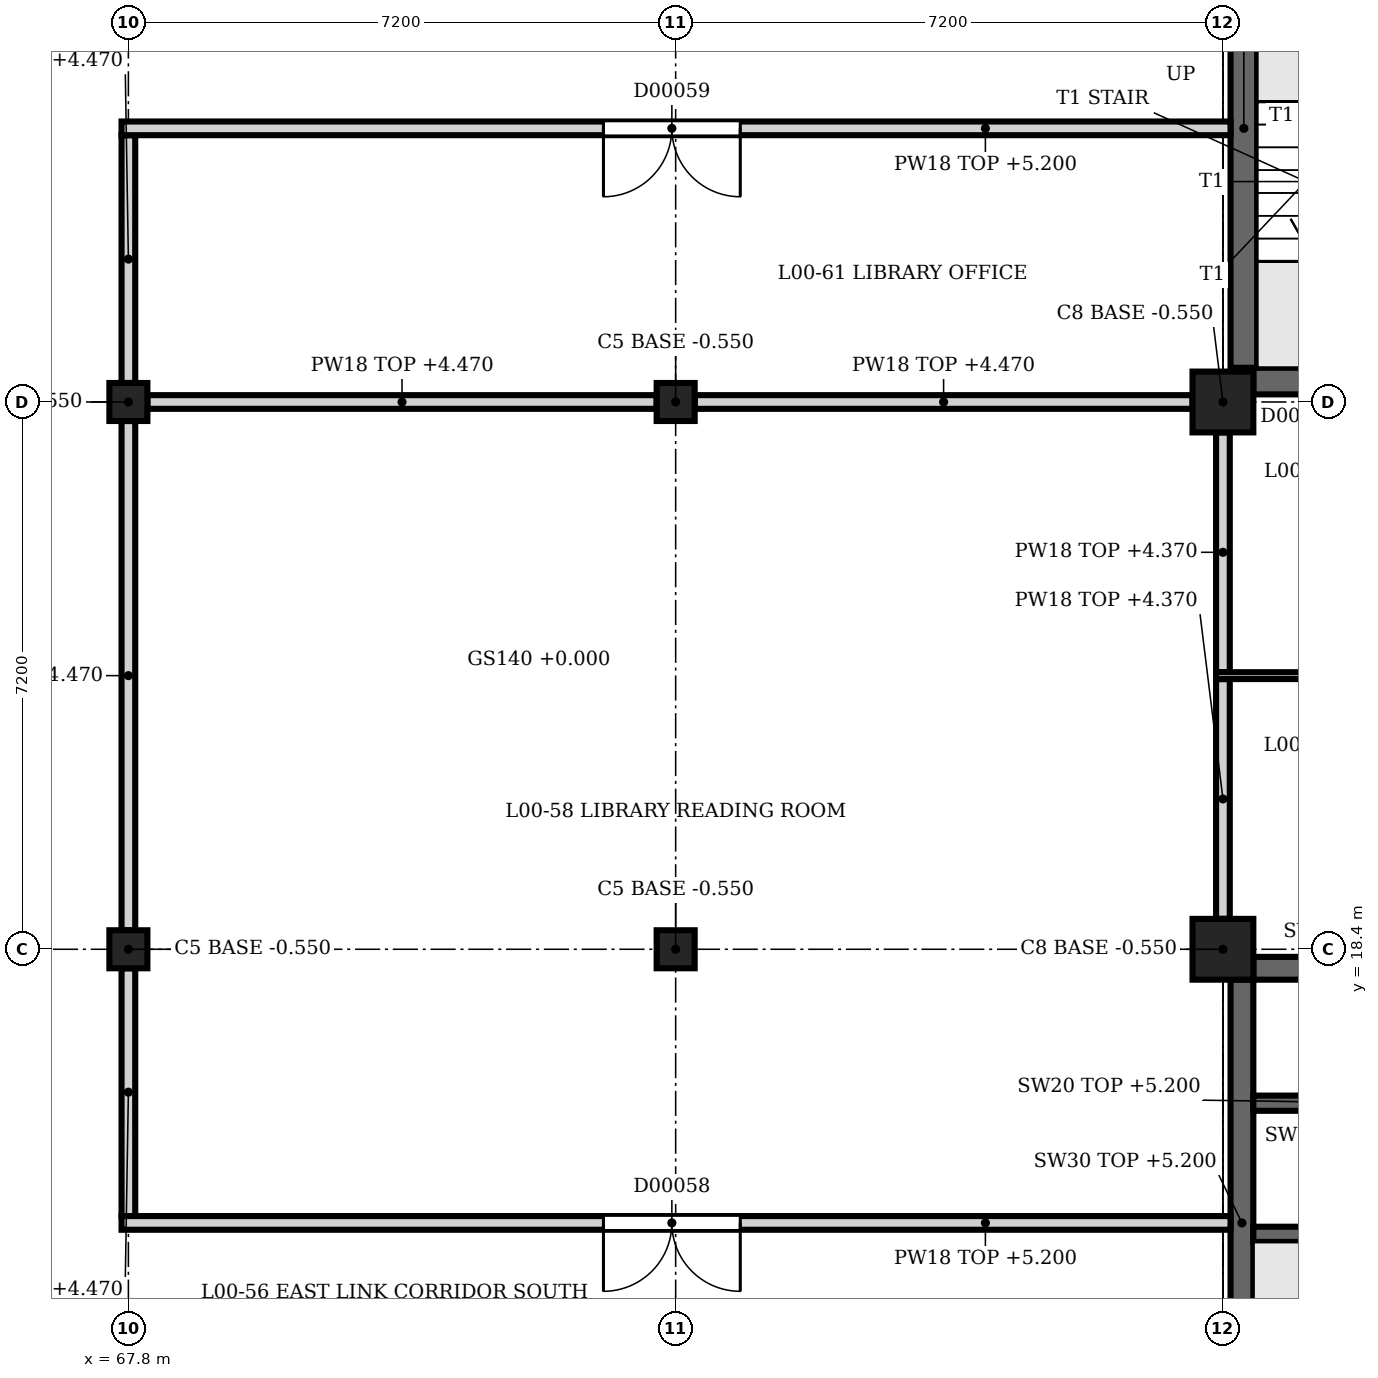
"""IFC4 building model, lengths in metres.
Left out: names, types, materials, properties, quantities, classifications, styles, units other than length and angle.
Written with IfcOpenShell. Run it as: python <this file> out.ifc"""

import sys

from ifc_helpers import new_model, si_unit, direction, frame, frame_2d, origin, origin_2d, place, context, subcontext, project, spatial, rectangle, extrude, element, fill, save


model = new_model("IFC4")
c1 = context("Model", 3, precision=1e-05, world=origin(), true_north=direction((0.0, 1.0)))
c2 = subcontext(c1, "Body", "Model", "MODEL_VIEW")
j1 = project(units=[si_unit("LENGTHUNIT", "METRE"), si_unit("PLANEANGLEUNIT", "RADIAN")], contexts=[c1])
p1 = place(None, origin())
s1 = spatial("IfcSite", under=j1, at=p1, CompositionType="ELEMENT")
p2 = place(p1, origin())
s2 = spatial("IfcBuilding", under=s1, at=p2, CompositionType="ELEMENT")
p3 = place(p2, origin())
s3 = spatial("IfcBuildingStorey", under=s2, at=p3, CompositionType="ELEMENT", Elevation=0.0)
for number, where, z_axis, x_axis in (
    (1, (82.2, 18.4, -0.55), (0.0, 0.0, 1.0), (1.0, 0.0, 0.0)),
    (2, (82.2, 25.6, -0.55), (0.0, 0.0, 1.0), (1.0, 0.0, 0.0)),
):
    element("IfcColumn", number, at=place(p3, frame(where, z_axis=z_axis, x_axis=x_axis)), inside=s3, PredefinedType="COLUMN", context=c2, shape_type="SweptSolid", body=[
        extrude(rectangle(XDim=0.8, YDim=0.8, at=origin_2d()), origin(), (0.0, 0.0, 1.0), 5.95),
    ])
for number, where, z_axis, x_axis in (
    (3, (67.8, 18.4, -0.55), (0.0, 0.0, 1.0), (1.0, 0.0, 0.0)),
    (4, (67.8, 25.6, -0.55), (0.0, 0.0, 1.0), (1.0, 0.0, 0.0)),
    (5, (75.0, 18.4, -0.55), (0.0, 0.0, 1.0), (1.0, 0.0, 0.0)),
    (6, (75.0, 25.6, -0.55), (0.0, 0.0, 1.0), (1.0, 0.0, 0.0)),
):
    element("IfcColumn", number, at=place(p3, frame(where, z_axis=z_axis, x_axis=x_axis)), inside=s3, PredefinedType="COLUMN", context=c2, shape_type="SweptSolid", body=[
        extrude(rectangle(XDim=0.5, YDim=0.5, at=origin_2d()), origin(), (0.0, 0.0, 1.0), 5.95),
    ])
p4 = place(p3, frame((82.6, 25.875, 0.0), z_axis=(0.0, 0.0, 1.0), x_axis=(1.0, 0.0, 0.0)))
e7 = element("IfcWall", 7, at=p4, inside=s3, PredefinedType="SHEAR", context=c2, shape_type="SweptSolid", body=[
    extrude(rectangle(XDim=6.4, YDim=0.35, at=frame_2d((3.2, 0.0))), origin(), (0.0, 0.0, 1.0), 5.2),
])
p5 = place(p4, frame((3.8, 0.0, 0.0)))
e8 = element("IfcOpeningElement", 8, at=p5, cuts=e7, PredefinedType="OPENING", context=c2, shape_type="SweptSolid", body=[
    extrude(rectangle(XDim=1.2, YDim=2.1, at=frame_2d((0.6, 1.05))), frame((0.0, 0.185, 0.0), z_axis=(0.0, -1.0, 0.0), x_axis=(1.0, 0.0, 0.0)), (0.0, 0.0, 1.0), 0.37),
])
p6 = place(p3, frame((82.475, 26.05, 0.0), z_axis=(0.0, 0.0, 1.0), x_axis=(0.0, 1.0, 0.0)))
e9 = element("IfcWall", 9, at=p6, inside=s3, PredefinedType="SHEAR", context=c2, shape_type="SweptSolid", body=[
    extrude(rectangle(XDim=6.3, YDim=0.35, at=frame_2d((3.15, 0.0))), origin(), (0.0, 0.0, 1.0), 5.2),
])
for number, where, z_axis, x_axis in (
    (10, (82.45, 11.6, 0.0), (0.0, 0.0, 1.0), (0.0, 1.0, 0.0)),
    (11, (82.6, 18.15, 0.0), (0.0, 0.0, 1.0), (1.0, 0.0, 0.0)),
):
    element("IfcWall", number, at=place(p3, frame(where, z_axis=z_axis, x_axis=x_axis)), inside=s3, PredefinedType="SHEAR", context=c2, shape_type="SweptSolid", body=[
        extrude(rectangle(XDim=6.4, YDim=0.3, at=frame_2d((3.2, 0.0))), origin(), (0.0, 0.0, 1.0), 5.2),
    ])
p7 = place(p3, frame((82.6, 14.65, 0.0), z_axis=(0.0, 0.0, 1.0), x_axis=(1.0, 0.0, 0.0)))
e12 = element("IfcWall", 12, at=p7, inside=s3, PredefinedType="SHEAR", context=c2, shape_type="SweptSolid", body=[
    extrude(rectangle(XDim=6.4, YDim=0.2, at=frame_2d((3.2, 0.0))), origin(), (0.0, 0.0, 1.0), 5.2),
])
p8 = place(p7, frame((5.3, 0.0, 0.0)))
e13 = element("IfcOpeningElement", 13, at=p8, cuts=e12, PredefinedType="OPENING", context=c2, shape_type="SweptSolid", body=[
    extrude(rectangle(XDim=1.0, YDim=2.1, at=frame_2d((0.5, 1.05))), frame((0.0, 0.11, 0.0), z_axis=(0.0, -1.0, 0.0), x_axis=(1.0, 0.0, 0.0)), (0.0, 0.0, 1.0), 0.22),
])
p9 = place(p3, frame((82.6, 16.375, 0.0), z_axis=(0.0, 0.0, 1.0), x_axis=(1.0, 0.0, 0.0)))
e14 = element("IfcWall", 14, at=p9, inside=s3, PredefinedType="SHEAR", context=c2, shape_type="SweptSolid", body=[
    extrude(rectangle(XDim=3.8, YDim=0.2, at=frame_2d((1.9, 0.0))), origin(), (0.0, 0.0, 1.0), 5.2),
])
p10 = place(p3, frame((82.3, 14.8, 0.0), z_axis=(0.0, 0.0, 1.0), x_axis=(-1.0, 0.0, 0.0)))
e15 = element("IfcWall", 15, at=p10, inside=s3, PredefinedType="PARTITIONING", context=c2, shape_type="SweptSolid", body=[
    extrude(rectangle(XDim=14.59, YDim=0.18, at=frame_2d((7.295, 0.0))), origin(), (0.0, 0.0, 1.0), 5.2),
])
p11 = place(p10, frame((6.45, 0.0, 0.0)))
e16 = element("IfcOpeningElement", 16, at=p11, cuts=e15, PredefinedType="OPENING", context=c2, shape_type="SweptSolid", body=[
    extrude(rectangle(XDim=1.8, YDim=2.1, at=frame_2d((0.9, 1.05))), frame((0.0, 0.1, 0.0), z_axis=(0.0, -1.0, 0.0), x_axis=(1.0, 0.0, 0.0)), (0.0, 0.0, 1.0), 0.2),
])
p12 = place(p3, frame((82.11, 22.0, 0.0), z_axis=(0.0, 0.0, 1.0), x_axis=(1.0, 0.0, 0.0)))
e17 = element("IfcWall", 17, at=p12, inside=s3, PredefinedType="PARTITIONING", context=c2, shape_type="SweptSolid", body=[
    extrude(rectangle(XDim=3.735, YDim=0.09, at=frame_2d((1.867, 0.0))), origin(), (0.0, 0.0, 1.0), 5.2),
])
p13 = place(p3, frame((68.05, 25.6, 0.0), z_axis=(0.0, 0.0, 1.0), x_axis=(1.0, 0.0, 0.0)))
e18 = element("IfcWall", 18, at=p13, inside=s3, PredefinedType="PARTITIONING", context=c2, shape_type="SweptSolid", body=[
    extrude(rectangle(XDim=6.7, YDim=0.18, at=frame_2d((3.35, 0.0))), origin(), (0.0, 0.0, 1.0), 4.47),
])
p14 = place(p3, frame((75.25, 25.6, 0.0), z_axis=(0.0, 0.0, 1.0), x_axis=(1.0, 0.0, 0.0)))
e19 = element("IfcWall", 19, at=p14, inside=s3, PredefinedType="PARTITIONING", context=c2, shape_type="SweptSolid", body=[
    extrude(rectangle(XDim=6.55, YDim=0.18, at=frame_2d((3.275, 0.0))), origin(), (0.0, 0.0, 1.0), 4.47),
])
p15 = place(p3, frame((82.3, 29.2, 0.0), z_axis=(0.0, 0.0, 1.0), x_axis=(-1.0, 0.0, 0.0)))
e20 = element("IfcWall", 20, at=p15, inside=s3, PredefinedType="PARTITIONING", context=c2, shape_type="SweptSolid", body=[
    extrude(rectangle(XDim=14.59, YDim=0.18, at=frame_2d((7.295, 0.0))), origin(), (0.0, 0.0, 1.0), 5.2),
])
p16 = place(p15, frame((6.45, 0.0, 0.0)))
e21 = element("IfcOpeningElement", 21, at=p16, cuts=e20, PredefinedType="OPENING", context=c2, shape_type="SweptSolid", body=[
    extrude(rectangle(XDim=1.8, YDim=2.1, at=frame_2d((0.9, 1.05))), frame((0.0, 0.1, 0.0), z_axis=(0.0, -1.0, 0.0), x_axis=(1.0, 0.0, 0.0)), (0.0, 0.0, 1.0), 0.2),
])
p17 = place(p3, frame((67.8, 14.89, 0.0), z_axis=(0.0, 0.0, 1.0), x_axis=(0.0, 1.0, 0.0)))
e22 = element("IfcWall", 22, at=p17, inside=s3, PredefinedType="PARTITIONING", context=c2, shape_type="SweptSolid", body=[
    extrude(rectangle(XDim=3.26, YDim=0.18, at=frame_2d((1.63, 0.0))), origin(), (0.0, 0.0, 1.0), 4.47),
])
p18 = place(p3, frame((67.8, 18.65, 0.0), z_axis=(0.0, 0.0, 1.0), x_axis=(0.0, 1.0, 0.0)))
e23 = element("IfcWall", 23, at=p18, inside=s3, PredefinedType="PARTITIONING", context=c2, shape_type="SweptSolid", body=[
    extrude(rectangle(XDim=6.7, YDim=0.18, at=frame_2d((3.35, 0.0))), origin(), (0.0, 0.0, 1.0), 4.47),
])
p19 = place(p3, frame((67.8, 25.85, 0.0), z_axis=(0.0, 0.0, 1.0), x_axis=(0.0, 1.0, 0.0)))
e24 = element("IfcWall", 24, at=p19, inside=s3, PredefinedType="PARTITIONING", context=c2, shape_type="SweptSolid", body=[
    extrude(rectangle(XDim=3.26, YDim=0.18, at=frame_2d((1.63, 0.0))), origin(), (0.0, 0.0, 1.0), 4.47),
])
for number, where, z_axis, x_axis in (
    (25, (82.2, 18.8, 0.0), (0.0, 0.0, 1.0), (0.0, 1.0, 0.0)),
    (26, (82.2, 22.045, 0.0), (0.0, 0.0, 1.0), (0.0, 1.0, 0.0)),
):
    element("IfcWall", number, at=place(p3, frame(where, z_axis=z_axis, x_axis=x_axis)), inside=s3, PredefinedType="PARTITIONING", context=c2, shape_type="SweptSolid", body=[
        extrude(rectangle(XDim=3.155, YDim=0.18, at=frame_2d((1.578, 0.0))), origin(), (0.0, 0.0, 1.0), 4.37),
    ])
p20 = place(p11, origin())
e27 = element("IfcDoor", 27, at=p20, inside=s3, OperationType="SINGLE_SWING_LEFT", PredefinedType="DOOR", context=c2, shape_type="SweptSolid", body=[
    extrude(rectangle(XDim=1.8, YDim=2.1, at=frame_2d((0.9, 1.05))), frame((0.0, 0.025, 0.0), z_axis=(0.0, -1.0, 0.0), x_axis=(1.0, 0.0, 0.0)), (0.0, 0.0, 1.0), 0.05),
])
fill(e16, e27)
p21 = place(p16, origin())
e28 = element("IfcDoor", 28, at=p21, inside=s3, OperationType="SINGLE_SWING_LEFT", PredefinedType="DOOR", context=c2, shape_type="SweptSolid", body=[
    extrude(rectangle(XDim=1.8, YDim=2.1, at=frame_2d((0.9, 1.05))), frame((0.0, 0.025, 0.0), z_axis=(0.0, -1.0, 0.0), x_axis=(1.0, 0.0, 0.0)), (0.0, 0.0, 1.0), 0.05),
])
fill(e21, e28)
save(model, sys.argv[1])
